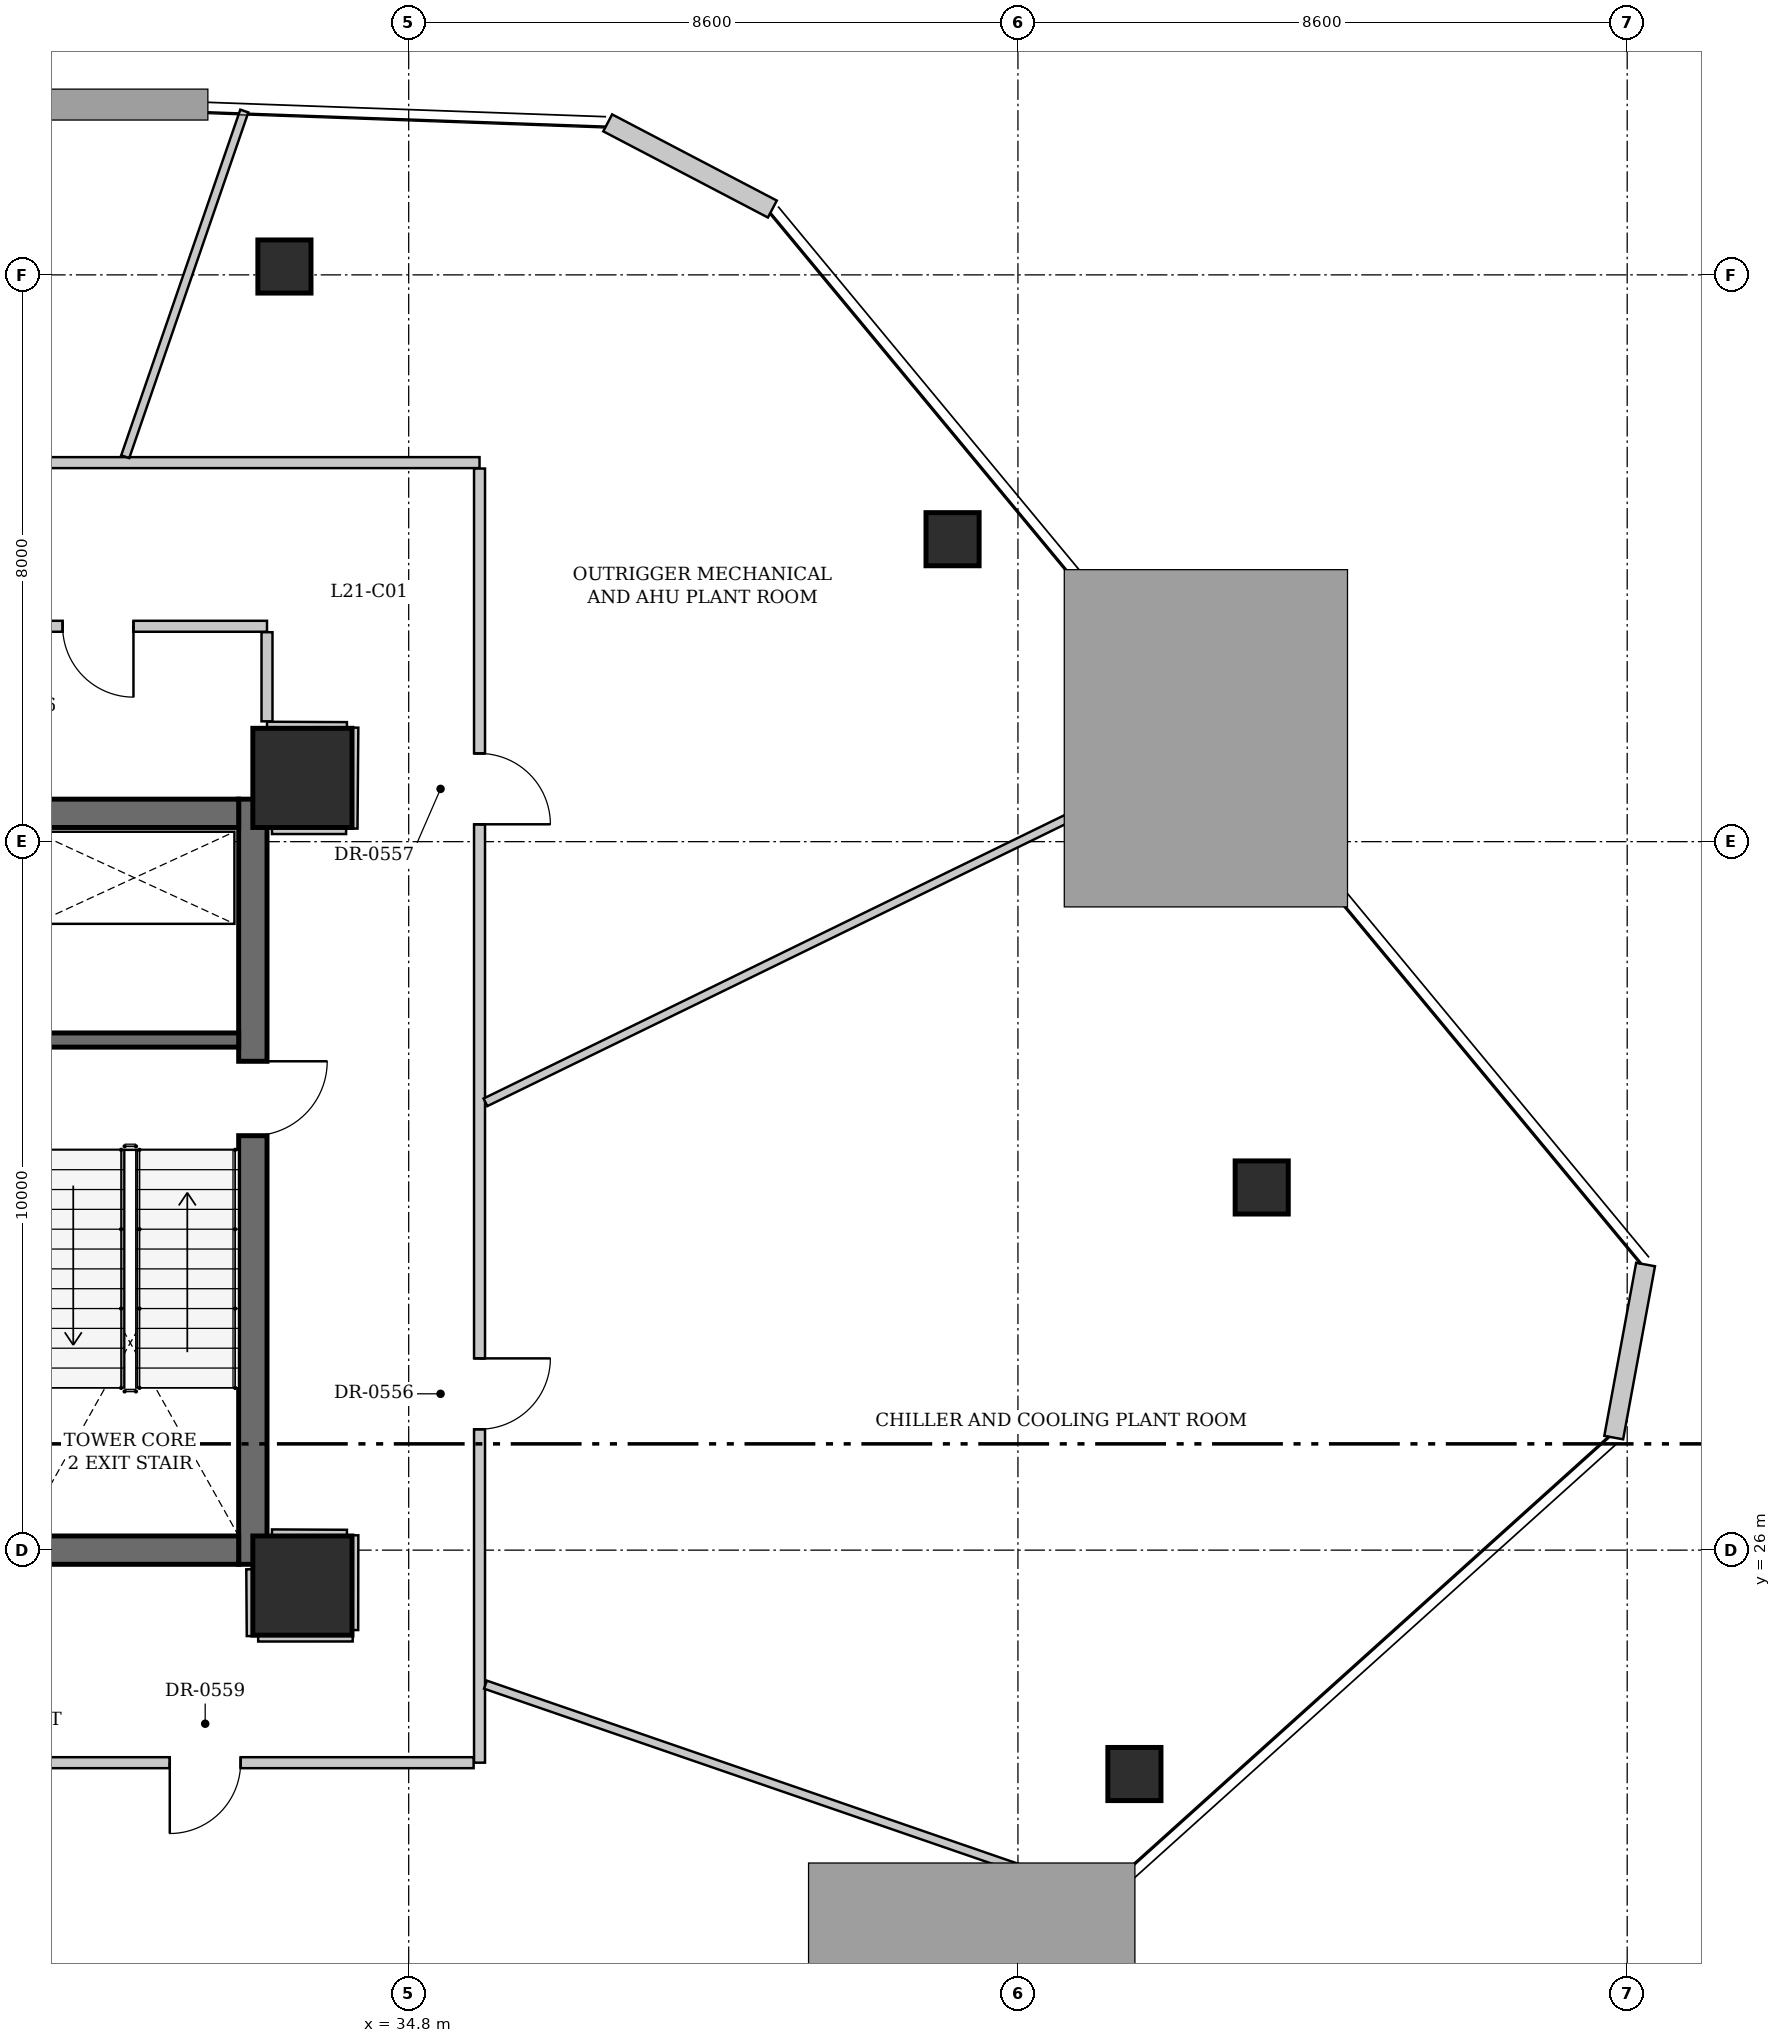
"""IFC4 building model, lengths in metres.
Left out: names, types, materials, properties, quantities, classifications, styles, units other than length and angle.
Written with IfcOpenShell. Run it as: python <this file> out.ifc"""

import sys

from ifc_helpers import new_model, si_unit, direction, frame, frame_2d, origin, origin_2d, place, context, subcontext, project, spatial, rectangle, hollow_rectangle, extrude, source, transform, mapped, element, fill, save


model = new_model("IFC4")
c1 = context("Model", 3, precision=1e-05, world=origin(), true_north=direction((0.0, 1.0)))
c2 = subcontext(c1, "Body", "Model", "MODEL_VIEW")
j1 = project(units=[si_unit("LENGTHUNIT", "METRE"), si_unit("PLANEANGLEUNIT", "RADIAN")], contexts=[c1])
p1 = place(None, origin())
s1 = spatial("IfcSite", under=j1, at=p1, CompositionType="ELEMENT")
p2 = place(p1, origin())
s2 = spatial("IfcBuilding", under=s1, at=p2, CompositionType="ELEMENT")
p3 = place(p2, frame((0.0, 0.0, 84.8)))
s3 = spatial("IfcBuildingStorey", under=s2, at=p3, CompositionType="ELEMENT", Elevation=84.8)
for number, where, z_axis, x_axis in (
    (1, (42.477, 40.269, 0.0), (0.0, 0.0, 1.0), (1.0, 0.0, 0.0)),
    (2, (46.841, 31.119, 0.0), (0.0, 0.0, 1.0), (1.0, 0.0, 0.0)),
    (3, (45.044, 22.84, 0.0), (0.0, 0.0, 1.0), (1.0, 0.0, 0.0)),
    (4, (33.046, 44.118, 0.0), (0.0, 0.0, 1.0), (1.0, 0.0, 0.0)),
):
    element("IfcColumn", number, at=place(p3, frame(where, z_axis=z_axis, x_axis=x_axis)), inside=s3, PredefinedType="COLUMN", context=c2, shape_type="SweptSolid", body=[
        extrude(hollow_rectangle(XDim=0.75, YDim=0.75, WallThickness=0.04, at=origin_2d()), origin(), (0.0, 0.0, 1.0), 4.15),
    ])
for number, where, z_axis, x_axis in (
    (5, (33.3, 25.5, 0.0), (0.0, 0.0, 1.0), (1.0, 0.0, 0.0)),
    (6, (33.3, 36.9, 0.0), (0.0, 0.0, 1.0), (1.0, 0.0, 0.0)),
):
    element("IfcColumn", number, at=place(p3, frame(where, z_axis=z_axis, x_axis=x_axis)), inside=s3, PredefinedType="COLUMN", context=c2, shape_type="SweptSolid", body=[
        extrude(rectangle(XDim=1.4, YDim=1.4, at=origin_2d()), origin(), (0.0, 0.0, 1.0), 4.15),
    ])
p4 = place(p3, frame((37.609, 46.146, 0.0), z_axis=(0.0, 0.0, 1.0), x_axis=(0.886009988584, -0.463666151589, 0.0)))
e7 = element("IfcWall", 7, at=p4, inside=s3, PredefinedType="SOLIDWALL", context=c2, shape_type="SweptSolid", body=[
    extrude(rectangle(XDim=2.623, YDim=0.27, at=frame_2d((1.312, 0.0))), origin(), (0.0, 0.0, 1.0), 4.15),
])
p5 = place(p3, frame((52.26, 30.031, 0.0), z_axis=(0.0, 0.0, 1.0), x_axis=(-0.180934792537, -0.983495094471, 0.0)))
e8 = element("IfcWall", 8, at=p5, inside=s3, PredefinedType="SOLIDWALL", context=c2, shape_type="SweptSolid", body=[
    extrude(rectangle(XDim=2.484, YDim=0.27, at=frame_2d((1.242, 0.0))), origin(), (0.0, 0.0, 1.0), 4.15),
])
p6 = place(p3, frame((32.6, 36.6, 0.0), z_axis=(0.0, 0.0, 1.0), x_axis=(0.0, -1.0, 0.0)))
e9 = element("IfcWall", 9, at=p6, inside=s3, PredefinedType="SHEAR", context=c2, shape_type="SweptSolid", body=[
    extrude(rectangle(XDim=10.8, YDim=0.4, at=frame_2d((5.4, 0.0))), origin(), (0.0, 0.0, 1.0), 4.6),
])
p7 = place(p6, frame((3.7, 0.0, 0.0)))
e10 = element("IfcOpeningElement", 10, at=p7, cuts=e9, PredefinedType="OPENING", context=c2, shape_type="SweptSolid", body=[
    extrude(rectangle(XDim=1.05, YDim=2.15, at=frame_2d((0.525, 1.075))), frame((0.0, 0.21, 0.0), z_axis=(0.0, -1.0, 0.0), x_axis=(1.0, 0.0, 0.0)), (0.0, 0.0, 1.0), 0.42),
])
p8 = place(p3, frame((19.6, 36.4, 0.0), z_axis=(0.0, 0.0, 1.0), x_axis=(1.0, 0.0, 0.0)))
e11 = element("IfcWall", 11, at=p8, inside=s3, PredefinedType="SHEAR", context=c2, shape_type="SweptSolid", body=[
    extrude(rectangle(XDim=12.8, YDim=0.4, at=frame_2d((6.4, 0.0))), origin(), (0.0, 0.0, 1.0), 4.6),
])
p9 = place(p3, frame((32.4, 26.0, 0.0), z_axis=(0.0, 0.0, 1.0), x_axis=(-1.0, 0.0, 0.0)))
e12 = element("IfcWall", 12, at=p9, inside=s3, PredefinedType="SHEAR", context=c2, shape_type="SweptSolid", body=[
    extrude(rectangle(XDim=12.8, YDim=0.4, at=frame_2d((6.4, 0.0))), origin(), (0.0, 0.0, 1.0), 4.6),
])
p10 = place(p9, frame((10.75, 0.0, 0.0)))
e13 = element("IfcOpeningElement", 13, at=p10, cuts=e12, PredefinedType="OPENING", context=c2, shape_type="SweptSolid", body=[
    extrude(rectangle(XDim=1.05, YDim=2.15, at=frame_2d((0.525, 1.075))), frame((0.0, 0.21, 0.0), z_axis=(0.0, -1.0, 0.0), x_axis=(1.0, 0.0, 0.0)), (0.0, 0.0, 1.0), 0.42),
])
p11 = place(p9, frame((5.67, 0.0, 0.0)))
e14 = element("IfcOpeningElement", 14, at=p11, cuts=e12, PredefinedType="OPENING", context=c2, shape_type="SweptSolid", body=[
    extrude(rectangle(XDim=1.45, YDim=2.2, at=frame_2d((0.725, 1.1))), frame((0.0, 0.21, 0.0), z_axis=(0.0, -1.0, 0.0), x_axis=(1.0, 0.0, 0.0)), (0.0, 0.0, 1.0), 0.42),
])
p12 = place(p3, frame((29.34, 33.2, 0.0), z_axis=(0.0, 0.0, 1.0), x_axis=(1.0, 0.0, 0.0)))
e15 = element("IfcWall", 15, at=p12, inside=s3, PredefinedType="SHEAR", context=c2, shape_type="SweptSolid", body=[
    extrude(rectangle(XDim=3.06, YDim=0.2, at=frame_2d((1.53, 0.0))), origin(), (0.0, 0.0, 1.0), 4.6),
])
p13 = place(p3, frame((15.2, 41.35, 0.0), z_axis=(0.0, 0.0, 1.0), x_axis=(1.0, 0.0, 0.0)))
e16 = element("IfcWall", 16, at=p13, inside=s3, PredefinedType="PARTITIONING", context=c2, shape_type="SweptSolid", body=[
    extrude(rectangle(XDim=20.6, YDim=0.155, at=frame_2d((10.3, 0.0))), origin(), (0.0, 0.0, 1.0), 4.15),
])
p14 = place(p13, frame((4.809, 0.0, 0.0)))
e17 = element("IfcOpeningElement", 17, at=p14, cuts=e16, PredefinedType="OPENING", context=c2, shape_type="SweptSolid", body=[
    extrude(rectangle(XDim=1.0, YDim=2.15, at=frame_2d((0.5, 1.075))), frame((0.0, 0.087, 0.0), z_axis=(0.0, -1.0, 0.0), x_axis=(1.0, 0.0, 0.0)), (0.0, 0.0, 1.0), 0.175),
])
p15 = place(p3, frame((35.8, 41.267, 0.0), z_axis=(0.0, 0.0, 1.0), x_axis=(0.0, -1.0, 0.0)))
e18 = element("IfcWall", 18, at=p15, inside=s3, PredefinedType="PARTITIONING", context=c2, shape_type="SweptSolid", body=[
    extrude(rectangle(XDim=18.267, YDim=0.155, at=frame_2d((9.133, 0.0))), origin(), (0.0, 0.0, 1.0), 4.15),
])
p16 = place(p15, frame((12.56, 0.0, 0.0)))
e19 = element("IfcOpeningElement", 19, at=p16, cuts=e18, PredefinedType="OPENING", context=c2, shape_type="SweptSolid", body=[
    extrude(rectangle(XDim=1.0, YDim=2.15, at=frame_2d((0.5, 1.075))), frame((0.0, 0.087, 0.0), z_axis=(0.0, -1.0, 0.0), x_axis=(1.0, 0.0, 0.0)), (0.0, 0.0, 1.0), 0.175),
])
p17 = place(p15, frame((4.021, 0.0, 0.0)))
e20 = element("IfcOpeningElement", 20, at=p17, cuts=e18, PredefinedType="OPENING", context=c2, shape_type="SweptSolid", body=[
    extrude(rectangle(XDim=1.0, YDim=2.15, at=frame_2d((0.5, 1.075))), frame((0.0, 0.087, 0.0), z_axis=(0.0, -1.0, 0.0), x_axis=(1.0, 0.0, 0.0)), (0.0, 0.0, 1.0), 0.175),
])
p18 = place(p3, frame((35.717, 23.0, 0.0), z_axis=(0.0, 0.0, 1.0), x_axis=(-1.0, 0.0, 0.0)))
e21 = element("IfcWall", 21, at=p18, inside=s3, PredefinedType="PARTITIONING", context=c2, shape_type="SweptSolid", body=[
    extrude(rectangle(XDim=20.517, YDim=0.155, at=frame_2d((10.258, 0.0))), origin(), (0.0, 0.0, 1.0), 4.15),
])
p19 = place(p18, frame((17.335, 0.0, 0.0)))
e22 = element("IfcOpeningElement", 22, at=p19, cuts=e21, PredefinedType="OPENING", context=c2, shape_type="SweptSolid", body=[
    extrude(rectangle(XDim=1.0, YDim=2.15, at=frame_2d((0.5, 1.075))), frame((0.0, 0.087, 0.0), z_axis=(0.0, -1.0, 0.0), x_axis=(1.0, 0.0, 0.0)), (0.0, 0.0, 1.0), 0.175),
])
p20 = place(p18, frame((3.289, 0.0, 0.0)))
e23 = element("IfcOpeningElement", 23, at=p20, cuts=e21, PredefinedType="OPENING", context=c2, shape_type="SweptSolid", body=[
    extrude(rectangle(XDim=1.0, YDim=2.15, at=frame_2d((0.5, 1.075))), frame((0.0, 0.087, 0.0), z_axis=(0.0, -1.0, 0.0), x_axis=(1.0, 0.0, 0.0)), (0.0, 0.0, 1.0), 0.175),
])
p21 = place(p3, frame((32.8, 39.04, 0.0), z_axis=(0.0, 0.0, 1.0), x_axis=(-1.0, 0.0, 0.0)))
e24 = element("IfcWall", 24, at=p21, inside=s3, PredefinedType="PARTITIONING", context=c2, shape_type="SweptSolid", body=[
    extrude(rectangle(XDim=4.77, YDim=0.155, at=frame_2d((2.385, 0.0))), origin(), (0.0, 0.0, 1.0), 4.15),
])
p22 = place(p21, frame((1.885, 0.0, 0.0)))
e25 = element("IfcOpeningElement", 25, at=p22, cuts=e24, PredefinedType="OPENING", context=c2, shape_type="SweptSolid", body=[
    extrude(rectangle(XDim=1.0, YDim=2.15, at=frame_2d((0.5, 1.075))), frame((0.0, 0.087, 0.0), z_axis=(0.0, -1.0, 0.0), x_axis=(1.0, 0.0, 0.0)), (0.0, 0.0, 1.0), 0.175),
])
p23 = place(p3, frame((34.0, 36.185, 0.0), z_axis=(0.0, 0.0, 1.0), x_axis=(0.008225942757, 0.999966166361, 0.0)))
e26 = element("IfcWall", 26, at=p23, inside=s3, PredefinedType="PARTITIONING", context=c2, shape_type="SweptSolid", body=[
    extrude(rectangle(XDim=1.425, YDim=0.155, at=frame_2d((0.712, 0.0))), origin(), (0.0, 0.0, 1.0), 4.15),
])
p24 = place(p3, frame((33.928, 37.61, 0.0), z_axis=(0.0, 0.0, 1.0), x_axis=(-0.999989669582, 0.004545407589, 0.0)))
e27 = element("IfcWall", 27, at=p24, inside=s3, PredefinedType="PARTITIONING", context=c2, shape_type="SweptSolid", body=[
    extrude(rectangle(XDim=1.128, YDim=0.155, at=frame_2d((0.564, 0.0))), origin(), (0.0, 0.0, 1.0), 2.725),
])
p25 = place(p3, frame((32.8, 37.698, 0.0), z_axis=(0.0, 0.0, 1.0), x_axis=(0.0, 1.0, 0.0)))
e28 = element("IfcWall", 28, at=p25, inside=s3, PredefinedType="PARTITIONING", context=c2, shape_type="SweptSolid", body=[
    extrude(rectangle(XDim=1.258, YDim=0.155, at=frame_2d((0.629, 0.0))), origin(), (0.0, 0.0, 1.0), 3.712),
])
p26 = place(p3, frame((32.585, 25.73, 0.0), z_axis=(0.0, 0.0, 1.0), x_axis=(0.007253695172, -0.999973691607, 0.0)))
e29 = element("IfcWall", 29, at=p26, inside=s3, PredefinedType="PARTITIONING", context=c2, shape_type="SweptSolid", body=[
    extrude(rectangle(XDim=0.942, YDim=0.155, at=frame_2d((0.471, 0.0))), origin(), (0.0, 0.0, 1.0), 2.725),
])
p27 = place(p3, frame((32.675, 24.788, 0.0), z_axis=(0.0, 0.0, 1.0), x_axis=(0.999999849328, 0.000548947767, 0.0)))
e30 = element("IfcWall", 30, at=p27, inside=s3, PredefinedType="PARTITIONING", context=c2, shape_type="SweptSolid", body=[
    extrude(rectangle(XDim=1.334, YDim=0.155, at=frame_2d((0.667, 0.0))), origin(), (0.0, 0.0, 1.0), 4.15),
])
p28 = place(p3, frame((34.01, 24.872, 0.0), z_axis=(0.0, 0.0, 1.0), x_axis=(0.001642633301, 0.999998650877, 0.0)))
e31 = element("IfcWall", 31, at=p28, inside=s3, PredefinedType="PARTITIONING", context=c2, shape_type="SweptSolid", body=[
    extrude(rectangle(XDim=1.338, YDim=0.155, at=frame_2d((0.669, 0.0))), origin(), (0.0, 0.0, 1.0), 2.725),
])
p29 = place(p3, frame((33.928, 26.21, 0.0), z_axis=(0.0, 0.0, 1.0), x_axis=(-0.999988255797, 0.004846469737, 0.0)))
e32 = element("IfcWall", 32, at=p29, inside=s3, PredefinedType="PARTITIONING", context=c2, shape_type="SweptSolid", body=[
    extrude(rectangle(XDim=1.058, YDim=0.155, at=frame_2d((0.529, 0.0))), origin(), (0.0, 0.0, 1.0), 2.725),
])
p30 = place(p3, frame((32.87, 36.185, 0.0), z_axis=(0.0, 0.0, 1.0), x_axis=(1.0, 0.0, 0.0)))
e33 = element("IfcWall", 33, at=p30, inside=s3, PredefinedType="PARTITIONING", context=c2, shape_type="SweptSolid", body=[
    extrude(rectangle(XDim=1.046, YDim=0.155, at=frame_2d((0.523, 0.0))), origin(), (0.0, 0.0, 1.0), 2.725),
])
p31 = place(p3, frame((28.231, 22.917, 0.0), z_axis=(0.0, 0.0, 1.0), x_axis=(0.438691499882, -0.898637728972, 0.0)))
e34 = element("IfcWall", 34, at=p31, inside=s3, PredefinedType="PARTITIONING", context=c2, shape_type="SweptSolid", body=[
    extrude(rectangle(XDim=12.784, YDim=0.12, at=frame_2d((6.392, 0.0))), origin(), (0.0, 0.0, 1.0), 4.15),
])
p32 = place(p3, frame((35.884, 24.101, 0.0), z_axis=(0.0, 0.0, 1.0), x_axis=(0.945437205547, -0.325804374383, 0.0)))
e35 = element("IfcWall", 35, at=p32, inside=s3, PredefinedType="PARTITIONING", context=c2, shape_type="SweptSolid", body=[
    extrude(rectangle(XDim=9.208, YDim=0.12, at=frame_2d((4.604, 0.0))), origin(), (0.0, 0.0, 1.0), 4.15),
])
p33 = place(p3, frame((35.884, 32.321, 0.0), z_axis=(0.0, 0.0, 1.0), x_axis=(0.898777856743, 0.438404338744, 0.0)))
e36 = element("IfcWall", 36, at=p33, inside=s3, PredefinedType="PARTITIONING", context=c2, shape_type="SweptSolid", body=[
    extrude(rectangle(XDim=11.469, YDim=0.12, at=frame_2d((5.734, 0.0))), origin(), (0.0, 0.0, 1.0), 4.15),
])
p34 = place(p3, frame((30.799, 41.434, 0.0), z_axis=(0.0, 0.0, 1.0), x_axis=(0.32567865408, 0.945480520305, 0.0)))
e37 = element("IfcWall", 37, at=p34, inside=s3, PredefinedType="PARTITIONING", context=c2, shape_type="SweptSolid", body=[
    extrude(rectangle(XDim=5.16, YDim=0.12, at=frame_2d((2.58, 0.0))), origin(), (0.0, 0.0, 1.0), 4.15),
])
m1 = source(origin(), c2, "Body", "SweptSolid", [
    extrude(rectangle(XDim=1.05, YDim=2.15, at=frame_2d((0.525, 1.075))), frame((0.0, 0.025, 0.0), z_axis=(0.0, -1.0, 0.0), x_axis=(1.0, 0.0, 0.0)), (0.0, 0.0, 1.0), 0.05),
])
p35 = place(p7, origin())
e38 = element("IfcDoor", 38, at=p35, inside=s3, OperationType="SINGLE_SWING_LEFT", PredefinedType="DOOR", context=c2, shape_type="MappedRepresentation", body=[
    mapped(m1, transform((0.0, 0.0, 0.0), x_axis=(1.0, 0.0, 0.0), y_axis=(0.0, 1.0, 0.0), z_axis=(0.0, 0.0, 1.0), scale=1.0)),
])
fill(e10, e38)
m2 = source(origin(), c2, "Body", "SweptSolid", [
    extrude(rectangle(XDim=1.0, YDim=2.15, at=frame_2d((0.5, 1.075))), frame((0.0, 0.025, 0.0), z_axis=(0.0, -1.0, 0.0), x_axis=(1.0, 0.0, 0.0)), (0.0, 0.0, 1.0), 0.05),
])
p36 = place(p16, origin())
e39 = element("IfcDoor", 39, at=p36, inside=s3, OperationType="SINGLE_SWING_LEFT", PredefinedType="DOOR", context=c2, shape_type="MappedRepresentation", body=[
    mapped(m2, transform((0.0, 0.0, 0.0), x_axis=(1.0, 0.0, 0.0), y_axis=(0.0, 1.0, 0.0), z_axis=(0.0, 0.0, 1.0), scale=1.0)),
])
fill(e19, e39)
p37 = place(p17, origin())
e40 = element("IfcDoor", 40, at=p37, inside=s3, OperationType="SINGLE_SWING_RIGHT", PredefinedType="DOOR", context=c2, shape_type="MappedRepresentation", body=[
    mapped(m2, transform((0.0, 0.0, 0.0), x_axis=(1.0, 0.0, 0.0), y_axis=(0.0, 1.0, 0.0), z_axis=(0.0, 0.0, 1.0), scale=1.0)),
])
fill(e20, e40)
p38 = place(p20, origin())
e41 = element("IfcDoor", 41, at=p38, inside=s3, OperationType="SINGLE_SWING_RIGHT", PredefinedType="DOOR", context=c2, shape_type="MappedRepresentation", body=[
    mapped(m2, transform((0.0, 0.0, 0.0), x_axis=(1.0, 0.0, 0.0), y_axis=(0.0, 1.0, 0.0), z_axis=(0.0, 0.0, 1.0), scale=1.0)),
])
fill(e23, e41)
p39 = place(p22, origin())
e42 = element("IfcDoor", 42, at=p39, inside=s3, OperationType="SINGLE_SWING_LEFT", PredefinedType="DOOR", context=c2, shape_type="MappedRepresentation", body=[
    mapped(m2, transform((0.0, 0.0, 0.0), x_axis=(1.0, 0.0, 0.0), y_axis=(0.0, 1.0, 0.0), z_axis=(0.0, 0.0, 1.0), scale=1.0)),
])
fill(e25, e42)
save(model, sys.argv[1])
